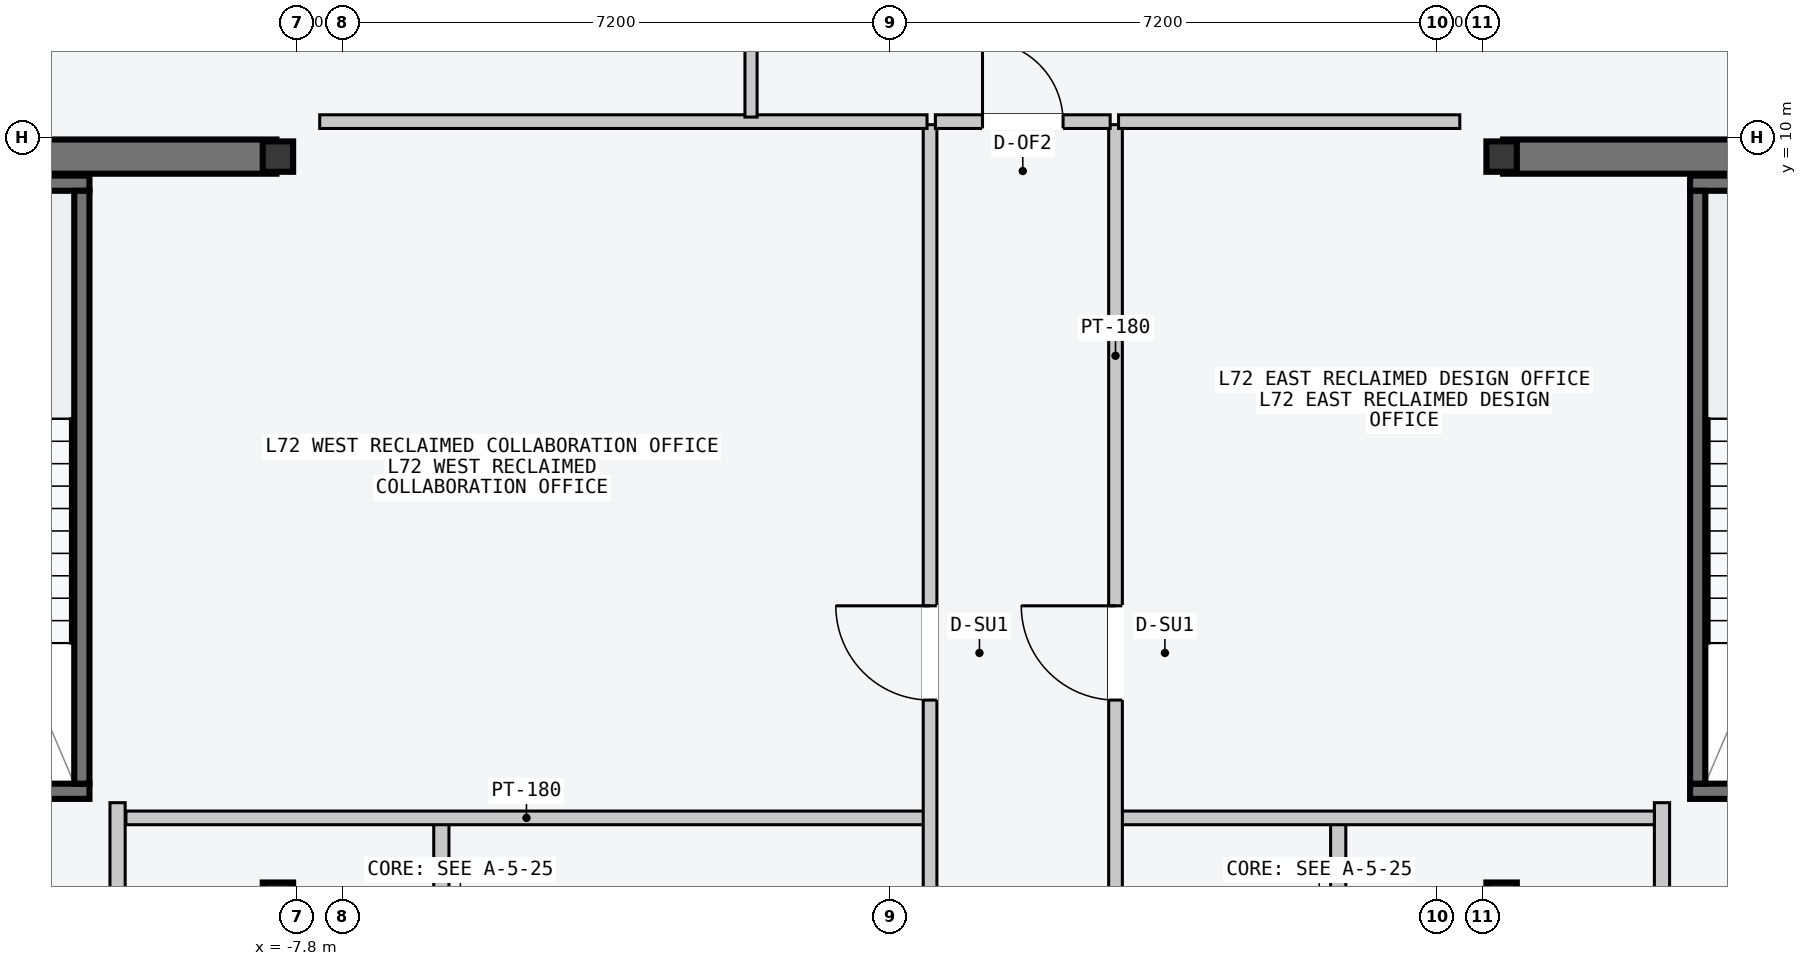
"""IFC4 building model, lengths in metres.
Left out: names, types, materials, properties, quantities, classifications, styles, units other than length and angle.
Written with IfcOpenShell. Run it as: python <this file> out.ifc"""

import sys

from ifc_helpers import new_model, si_unit, direction, frame, frame_2d, origin, origin_2d, place, context, subcontext, project, spatial, rectangle, i_section, extrude, element, fill, save


model = new_model("IFC4")
c1 = context("Model", 3, precision=1e-05, world=origin(), true_north=direction((0.0, 1.0)))
c2 = subcontext(c1, "Body", "Model", "MODEL_VIEW")
j1 = project(units=[si_unit("LENGTHUNIT", "METRE"), si_unit("PLANEANGLEUNIT", "RADIAN")], contexts=[c1])
p1 = place(None, origin())
s1 = spatial("IfcSite", under=j1, at=p1, CompositionType="ELEMENT")
p2 = place(p1, origin())
s2 = spatial("IfcBuilding", under=s1, at=p2, CompositionType="ELEMENT")
p3 = place(p2, frame((0.0, 0.0, 272.4)))
s3 = spatial("IfcBuildingStorey", under=s2, at=p3, CompositionType="ELEMENT", Elevation=272.4)
for number, where, z_axis, x_axis in (
    (1, (-14.53, 9.75, -0.2), (0.0, 0.0, 1.0), (1.0, 0.0, 0.0)),
    (2, (8.07, 9.75, -0.2), (0.0, 0.0, 1.0), (1.0, 0.0, 0.0)),
):
    element("IfcWall", number, at=place(p3, frame(where, z_axis=z_axis, x_axis=x_axis)), inside=s3, PredefinedType="SHEAR", context=c2, shape_type="SweptSolid", body=[
        extrude(rectangle(XDim=6.46, YDim=0.45, at=frame_2d((3.23, 0.0))), origin(), (0.0, 0.0, 1.0), 3.6),
    ])
p4 = place(p3, frame((-14.25, 1.4, -0.2), z_axis=(0.0, 0.0, 1.0), x_axis=(1.0, 0.0, 0.0)))
e3 = element("IfcWall", 3, at=p4, inside=s3, PredefinedType="SOLIDWALL", context=c2, shape_type="SweptSolid", body=[
    extrude(rectangle(XDim=3.72, YDim=0.2, at=frame_2d((1.86, 0.0))), origin(), (0.0, 0.0, 1.0), 3.6),
])
p5 = place(p4, frame((1.5, 0.0, 0.2)))
e4 = element("IfcOpeningElement", 4, at=p5, cuts=e3, PredefinedType="OPENING", context=c2, shape_type="SweptSolid", body=[
    extrude(rectangle(XDim=1.12, YDim=2.18, at=frame_2d((0.56, 1.09))), frame((0.0, 0.11, 0.0), z_axis=(0.0, -1.0, 0.0), x_axis=(1.0, 0.0, 0.0)), (0.0, 0.0, 1.0), 0.22),
])
p6 = place(p3, frame((-14.25, 9.4, -0.2), z_axis=(0.0, 0.0, 1.0), x_axis=(1.0, 0.0, 0.0)))
e5 = element("IfcWall", 5, at=p6, inside=s3, PredefinedType="SOLIDWALL", context=c2, shape_type="SweptSolid", body=[
    extrude(rectangle(XDim=3.72, YDim=0.2, at=frame_2d((1.86, 0.0))), origin(), (0.0, 0.0, 1.0), 3.6),
])
p7 = place(p3, frame((-10.63, 1.5, -0.2), z_axis=(0.0, 0.0, 1.0), x_axis=(0.0, 1.0, 0.0)))
e6 = element("IfcWall", 6, at=p7, inside=s3, PredefinedType="SOLIDWALL", context=c2, shape_type="SweptSolid", body=[
    extrude(rectangle(XDim=7.8, YDim=0.2, at=frame_2d((3.9, 0.0))), origin(), (0.0, 0.0, 1.0), 3.6),
])
p8 = place(p3, frame((10.53, 1.4, -0.2), z_axis=(0.0, 0.0, 1.0), x_axis=(1.0, 0.0, 0.0)))
e7 = element("IfcWall", 7, at=p8, inside=s3, PredefinedType="SOLIDWALL", context=c2, shape_type="SweptSolid", body=[
    extrude(rectangle(XDim=3.72, YDim=0.2, at=frame_2d((1.86, 0.0))), origin(), (0.0, 0.0, 1.0), 3.6),
])
p9 = place(p8, frame((1.5, 0.0, 0.2)))
e8 = element("IfcOpeningElement", 8, at=p9, cuts=e7, PredefinedType="OPENING", context=c2, shape_type="SweptSolid", body=[
    extrude(rectangle(XDim=1.12, YDim=2.18, at=frame_2d((0.56, 1.09))), frame((0.0, 0.11, 0.0), z_axis=(0.0, -1.0, 0.0), x_axis=(1.0, 0.0, 0.0)), (0.0, 0.0, 1.0), 0.22),
])
p10 = place(p3, frame((10.53, 9.4, -0.2), z_axis=(0.0, 0.0, 1.0), x_axis=(1.0, 0.0, 0.0)))
e9 = element("IfcWall", 9, at=p10, inside=s3, PredefinedType="SOLIDWALL", context=c2, shape_type="SweptSolid", body=[
    extrude(rectangle(XDim=3.72, YDim=0.2, at=frame_2d((1.86, 0.0))), origin(), (0.0, 0.0, 1.0), 3.6),
])
p11 = place(p3, frame((10.63, 1.5, -0.2), z_axis=(0.0, 0.0, 1.0), x_axis=(0.0, 1.0, 0.0)))
e10 = element("IfcWall", 10, at=p11, inside=s3, PredefinedType="SOLIDWALL", context=c2, shape_type="SweptSolid", body=[
    extrude(rectangle(XDim=7.8, YDim=0.2, at=frame_2d((3.9, 0.0))), origin(), (0.0, 0.0, 1.0), 3.6),
])
for number, where, z_axis, x_axis in (
    (11, (-8.05, 0.0, 0.0), (0.0, 0.0, 1.0), (1.0, 0.0, 0.0)),
    (12, (-8.05, 9.75, 0.0), (0.0, 0.0, 1.0), (1.0, 0.0, 0.0)),
    (13, (8.05, 0.0, 0.0), (0.0, 0.0, 1.0), (1.0, 0.0, 0.0)),
    (14, (8.05, 9.75, 0.0), (0.0, 0.0, 1.0), (1.0, 0.0, 0.0)),
):
    element("IfcColumn", number, at=place(p3, frame(where, z_axis=z_axis, x_axis=x_axis)), inside=s3, PredefinedType="COLUMN", context=c2, shape_type="SweptSolid", body=[
        extrude(i_section(OverallWidth=0.4, OverallDepth=0.4, WebThickness=0.013, FlangeThickness=0.021, at=origin_2d()), origin(), (0.0, 0.0, 1.0), 3.6),
    ])
p12 = place(p3, frame((-5.9, -9.45, 0.0), z_axis=(0.0, 0.0, 1.0), x_axis=(0.0, 1.0, 0.0)))
e15 = element("IfcWall", 15, at=p12, inside=s3, PredefinedType="PARTITIONING", context=c2, shape_type="SweptSolid", body=[
    extrude(rectangle(XDim=10.5, YDim=0.2, at=frame_2d((5.25, 0.0))), origin(), (0.0, 0.0, 1.0), 3.4),
])
p13 = place(p12, frame((3.9, 0.0, 0.0)))
e16 = element("IfcOpeningElement", 16, at=p13, cuts=e15, PredefinedType="OPENING", context=c2, shape_type="SweptSolid", body=[
    extrude(rectangle(XDim=1.5, YDim=2.2, at=frame_2d((0.75, 1.1))), frame((0.0, 0.11, 0.0), z_axis=(0.0, -1.0, 0.0), x_axis=(1.0, 0.0, 0.0)), (0.0, 0.0, 1.0), 0.22),
])
p14 = place(p3, frame((-10.16, -2.55, 0.0), z_axis=(0.0, 0.0, 1.0), x_axis=(0.0, 1.0, 0.0)))
e17 = element("IfcWall", 17, at=p14, inside=s3, PredefinedType="PARTITIONING", context=c2, shape_type="SweptSolid", body=[
    extrude(rectangle(XDim=3.8, YDim=0.2, at=frame_2d((1.9, 0.0))), origin(), (0.0, 0.0, 1.0), 3.4),
])
p15 = place(p14, frame((1.3, 0.0, 0.0)))
e18 = element("IfcOpeningElement", 18, at=p15, cuts=e17, PredefinedType="OPENING", context=c2, shape_type="SweptSolid", body=[
    extrude(rectangle(XDim=1.1, YDim=2.15, at=frame_2d((0.55, 1.075))), frame((0.0, 0.11, 0.0), z_axis=(0.0, -1.0, 0.0), x_axis=(1.0, 0.0, 0.0)), (0.0, 0.0, 1.0), 0.22),
])
p16 = place(p3, frame((5.9, -9.45, 0.0), z_axis=(0.0, 0.0, 1.0), x_axis=(0.0, 1.0, 0.0)))
e19 = element("IfcWall", 19, at=p16, inside=s3, PredefinedType="PARTITIONING", context=c2, shape_type="SweptSolid", body=[
    extrude(rectangle(XDim=10.5, YDim=0.2, at=frame_2d((5.25, 0.0))), origin(), (0.0, 0.0, 1.0), 3.4),
])
p17 = place(p16, frame((3.9, 0.0, 0.0)))
e20 = element("IfcOpeningElement", 20, at=p17, cuts=e19, PredefinedType="OPENING", context=c2, shape_type="SweptSolid", body=[
    extrude(rectangle(XDim=1.5, YDim=2.2, at=frame_2d((0.75, 1.1))), frame((0.0, 0.11, 0.0), z_axis=(0.0, -1.0, 0.0), x_axis=(1.0, 0.0, 0.0)), (0.0, 0.0, 1.0), 0.22),
])
p18 = place(p3, frame((10.16, -2.55, 0.0), z_axis=(0.0, 0.0, 1.0), x_axis=(0.0, 1.0, 0.0)))
e21 = element("IfcWall", 21, at=p18, inside=s3, PredefinedType="PARTITIONING", context=c2, shape_type="SweptSolid", body=[
    extrude(rectangle(XDim=3.8, YDim=0.2, at=frame_2d((1.9, 0.0))), origin(), (0.0, 0.0, 1.0), 3.4),
])
p19 = place(p18, frame((1.3, 0.0, 0.0)))
e22 = element("IfcOpeningElement", 22, at=p19, cuts=e21, PredefinedType="OPENING", context=c2, shape_type="SweptSolid", body=[
    extrude(rectangle(XDim=1.1, YDim=2.15, at=frame_2d((0.55, 1.075))), frame((0.0, 0.11, 0.0), z_axis=(0.0, -1.0, 0.0), x_axis=(1.0, 0.0, 0.0)), (0.0, 0.0, 1.0), 0.22),
])
p20 = place(p3, frame((-10.05, 1.05, 0.0), z_axis=(0.0, 0.0, 1.0), x_axis=(1.0, 0.0, 0.0)))
e23 = element("IfcWall", 23, at=p20, inside=s3, PredefinedType="PARTITIONING", context=c2, shape_type="SweptSolid", body=[
    extrude(rectangle(XDim=10.54, YDim=0.18, at=frame_2d((5.27, 0.0))), origin(), (0.0, 0.0, 1.0), 3.4),
])
p21 = place(p3, frame((0.53, -3.5, 0.0), z_axis=(0.0, 0.0, 1.0), x_axis=(0.0, 1.0, 0.0)))
e24 = element("IfcWall", 24, at=p21, inside=s3, PredefinedType="PARTITIONING", context=c2, shape_type="SweptSolid", body=[
    extrude(rectangle(XDim=13.67, YDim=0.18, at=frame_2d((6.835, 0.0))), origin(), (0.0, 0.0, 1.0), 3.4),
])
p22 = place(p21, frame((6.1, 0.0, 0.0)))
e25 = element("IfcOpeningElement", 25, at=p22, cuts=e24, PredefinedType="OPENING", context=c2, shape_type="SweptSolid", body=[
    extrude(rectangle(XDim=1.24, YDim=2.24, at=frame_2d((0.62, 1.12))), frame((0.0, 0.1, 0.0), z_axis=(0.0, -1.0, 0.0), x_axis=(1.0, 0.0, 0.0)), (0.0, 0.0, 1.0), 0.2),
])
p23 = place(p21, frame((1.6, 0.0, 0.0)))
e26 = element("IfcOpeningElement", 26, at=p23, cuts=e24, PredefinedType="OPENING", context=c2, shape_type="SweptSolid", body=[
    extrude(rectangle(XDim=0.96, YDim=2.18, at=frame_2d((0.48, 1.09))), frame((0.0, 0.1, 0.0), z_axis=(0.0, -1.0, 0.0), x_axis=(1.0, 0.0, 0.0)), (0.0, 0.0, 1.0), 0.2),
])
p24 = place(p3, frame((-7.5, 10.21, 0.0), z_axis=(0.0, 0.0, 1.0), x_axis=(1.0, 0.0, 0.0)))
e27 = element("IfcWall", 27, at=p24, inside=s3, PredefinedType="PARTITIONING", context=c2, shape_type="SweptSolid", body=[
    extrude(rectangle(XDim=7.99, YDim=0.18, at=frame_2d((3.995, 0.0))), origin(), (0.0, 0.0, 1.0), 3.4),
])
p25 = place(p3, frame((3.01, 1.05, 0.0), z_axis=(0.0, 0.0, 1.0), x_axis=(1.0, 0.0, 0.0)))
e28 = element("IfcWall", 28, at=p25, inside=s3, PredefinedType="PARTITIONING", context=c2, shape_type="SweptSolid", body=[
    extrude(rectangle(XDim=7.05, YDim=0.18, at=frame_2d((3.525, 0.0))), origin(), (0.0, 0.0, 1.0), 3.4),
])
p26 = place(p3, frame((2.97, -3.5, 0.0), z_axis=(0.0, 0.0, 1.0), x_axis=(0.0, 1.0, 0.0)))
e29 = element("IfcWall", 29, at=p26, inside=s3, PredefinedType="PARTITIONING", context=c2, shape_type="SweptSolid", body=[
    extrude(rectangle(XDim=13.67, YDim=0.18, at=frame_2d((6.835, 0.0))), origin(), (0.0, 0.0, 1.0), 3.4),
])
p27 = place(p26, frame((6.1, 0.0, 0.0)))
e30 = element("IfcOpeningElement", 30, at=p27, cuts=e29, PredefinedType="OPENING", context=c2, shape_type="SweptSolid", body=[
    extrude(rectangle(XDim=1.24, YDim=2.24, at=frame_2d((0.62, 1.12))), frame((0.0, 0.1, 0.0), z_axis=(0.0, -1.0, 0.0), x_axis=(1.0, 0.0, 0.0)), (0.0, 0.0, 1.0), 0.2),
])
p28 = place(p26, frame((1.6, 0.0, 0.0)))
e31 = element("IfcOpeningElement", 31, at=p28, cuts=e29, PredefinedType="OPENING", context=c2, shape_type="SweptSolid", body=[
    extrude(rectangle(XDim=0.96, YDim=2.18, at=frame_2d((0.48, 1.09))), frame((0.0, 0.1, 0.0), z_axis=(0.0, -1.0, 0.0), x_axis=(1.0, 0.0, 0.0)), (0.0, 0.0, 1.0), 0.2),
])
p29 = place(p3, frame((3.01, 10.21, 0.0), z_axis=(0.0, 0.0, 1.0), x_axis=(1.0, 0.0, 0.0)))
e32 = element("IfcWall", 32, at=p29, inside=s3, PredefinedType="PARTITIONING", context=c2, shape_type="SweptSolid", body=[
    extrude(rectangle(XDim=4.49, YDim=0.18, at=frame_2d((2.245, 0.0))), origin(), (0.0, 0.0, 1.0), 3.4),
])
p30 = place(p3, frame((-1.826, 10.27, 0.0), z_axis=(0.0, 0.0, 1.0), x_axis=(0.0, 1.0, 0.0)))
e33 = element("IfcWall", 33, at=p30, inside=s3, PredefinedType="PARTITIONING", context=c2, shape_type="SweptSolid", body=[
    extrude(rectangle(XDim=7.29, YDim=0.16, at=frame_2d((3.645, 0.0))), origin(), (0.0, 0.0, 1.0), 3.4),
])
p31 = place(p30, frame((1.15, 0.0, 0.0)))
e34 = element("IfcOpeningElement", 34, at=p31, cuts=e33, PredefinedType="OPENING", context=c2, shape_type="SweptSolid", body=[
    extrude(rectangle(XDim=0.96, YDim=2.18, at=frame_2d((0.48, 1.09))), frame((0.0, 0.09, 0.0), z_axis=(0.0, -1.0, 0.0), x_axis=(1.0, 0.0, 0.0)), (0.0, 0.0, 1.0), 0.18),
])
p32 = place(p3, frame((0.6, 10.21, 0.0), z_axis=(0.0, 0.0, 1.0), x_axis=(1.0, 0.0, 0.0)))
e35 = element("IfcWall", 35, at=p32, inside=s3, PredefinedType="PARTITIONING", context=c2, shape_type="SweptSolid", body=[
    extrude(rectangle(XDim=2.3, YDim=0.18, at=frame_2d((1.15, 0.0))), origin(), (0.0, 0.0, 1.0), 3.4),
])
p33 = place(p32, frame((0.62, 0.0, 0.0)))
e36 = element("IfcOpeningElement", 36, at=p33, cuts=e35, PredefinedType="OPENING", context=c2, shape_type="SweptSolid", body=[
    extrude(rectangle(XDim=1.06, YDim=2.2, at=frame_2d((0.53, 1.1))), frame((0.0, 0.1, 0.0), z_axis=(0.0, -1.0, 0.0), x_axis=(1.0, 0.0, 0.0)), (0.0, 0.0, 1.0), 0.2),
])
p34 = place(p22, origin())
e37 = element("IfcDoor", 37, at=p34, inside=s3, OperationType="SINGLE_SWING_RIGHT", PredefinedType="DOOR", context=c2, shape_type="SweptSolid", body=[
    extrude(rectangle(XDim=1.24, YDim=2.24, at=frame_2d((0.62, 1.12))), frame((0.0, 0.025, 0.0), z_axis=(0.0, -1.0, 0.0), x_axis=(1.0, 0.0, 0.0)), (0.0, 0.0, 1.0), 0.05),
])
fill(e25, e37)
p35 = place(p27, origin())
e38 = element("IfcDoor", 38, at=p35, inside=s3, OperationType="SINGLE_SWING_RIGHT", PredefinedType="DOOR", context=c2, shape_type="SweptSolid", body=[
    extrude(rectangle(XDim=1.24, YDim=2.24, at=frame_2d((0.62, 1.12))), frame((0.0, 0.025, 0.0), z_axis=(0.0, -1.0, 0.0), x_axis=(1.0, 0.0, 0.0)), (0.0, 0.0, 1.0), 0.05),
])
fill(e30, e38)
p36 = place(p33, origin())
e39 = element("IfcDoor", 39, at=p36, inside=s3, OperationType="SINGLE_SWING_LEFT", PredefinedType="DOOR", context=c2, shape_type="SweptSolid", body=[
    extrude(rectangle(XDim=1.06, YDim=2.2, at=frame_2d((0.53, 1.1))), frame((0.0, 0.025, 0.0), z_axis=(0.0, -1.0, 0.0), x_axis=(1.0, 0.0, 0.0)), (0.0, 0.0, 1.0), 0.05),
])
fill(e36, e39)
save(model, sys.argv[1])
